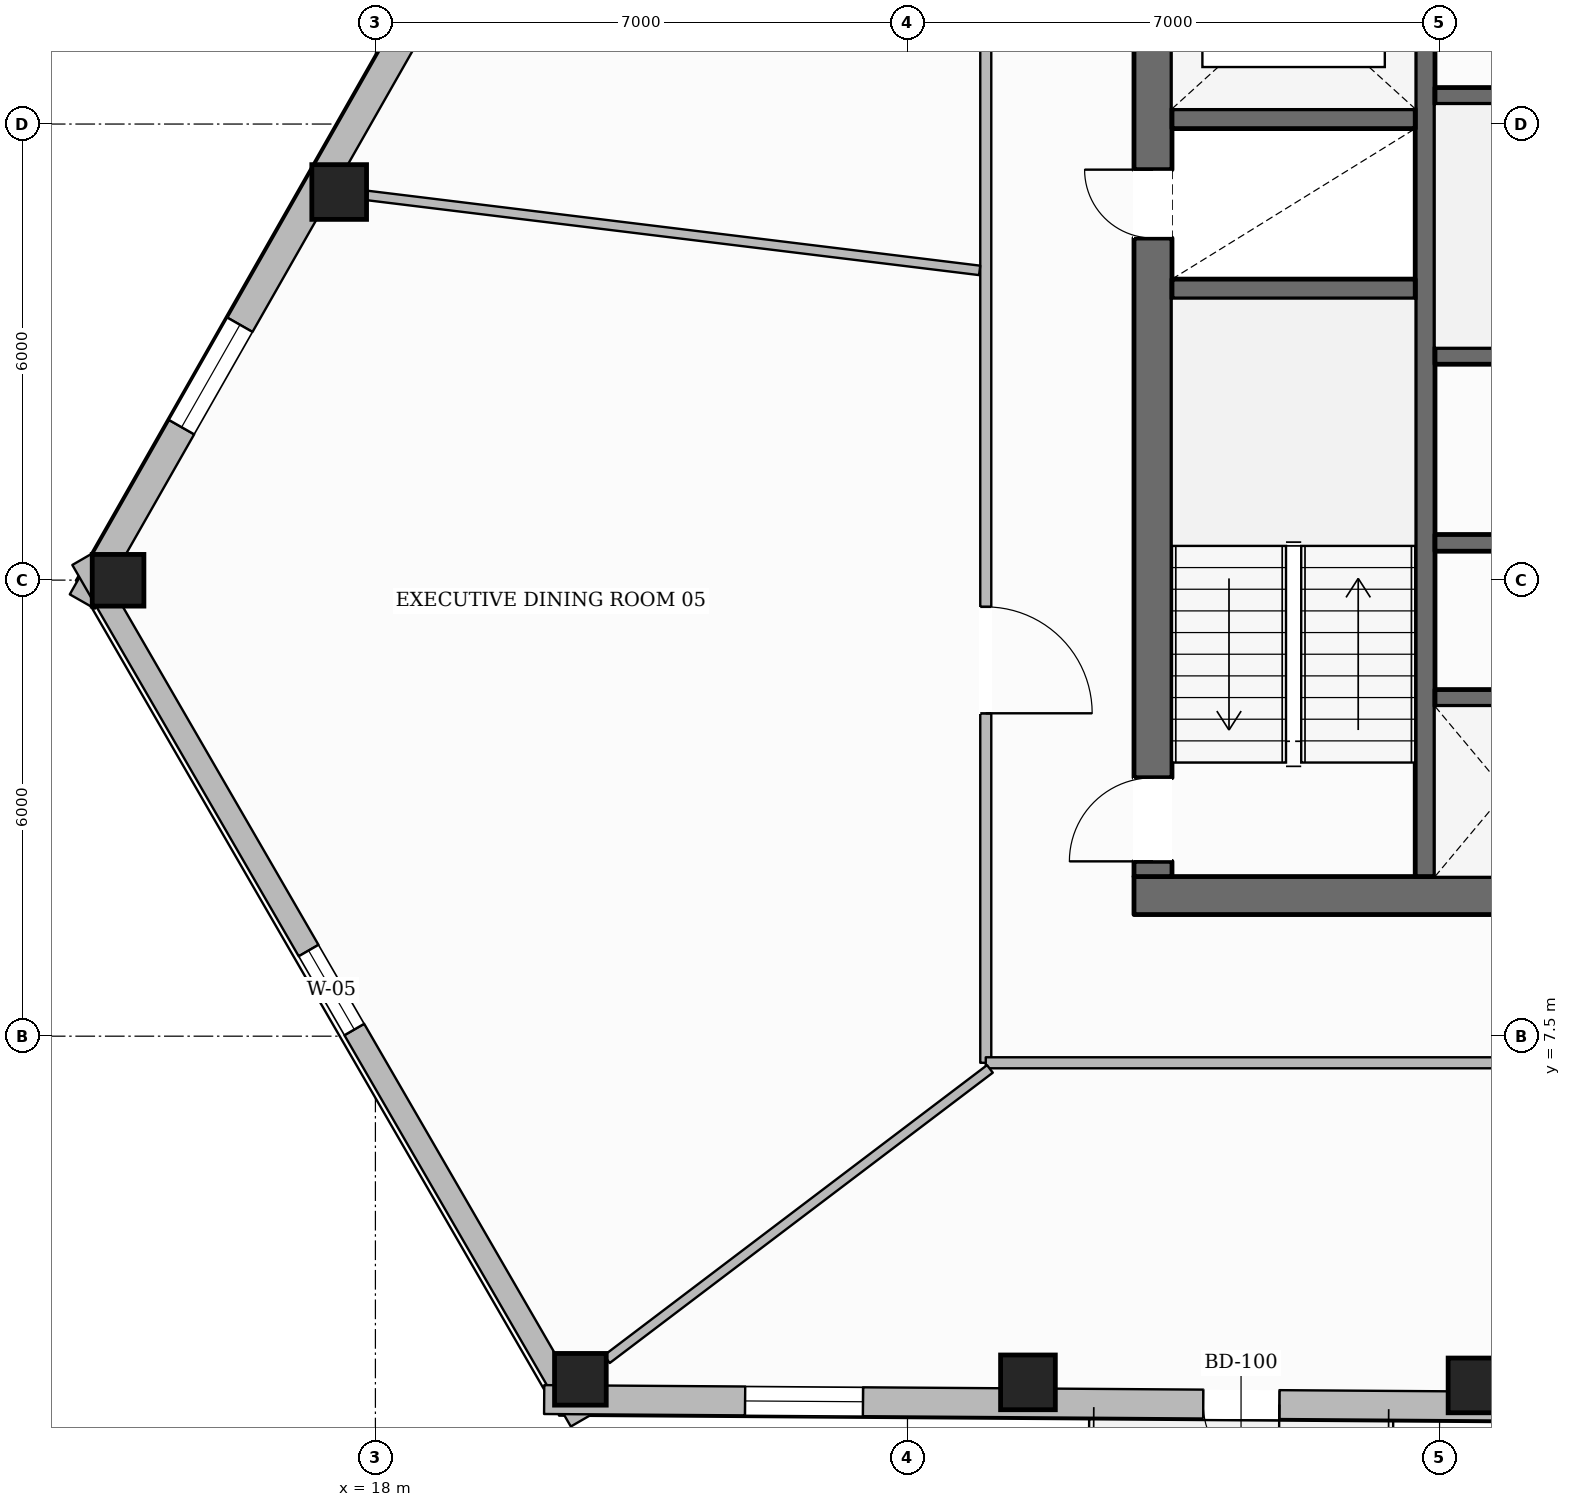
"""IFC4 building model, lengths in metres.
Left out: names, types, materials, properties, quantities, classifications, styles, units other than length and angle.
Written with IfcOpenShell. Run it as: python <this file> out.ifc"""

import sys

from ifc_helpers import new_model, si_unit, direction, frame, frame_2d, origin, origin_2d, place, context, subcontext, project, spatial, rectangle, hollow_rectangle, extrude, element, fill, save


model = new_model("IFC4")
c1 = context("Model", 3, precision=1e-05, world=origin(), true_north=direction((0.0, 1.0)))
c2 = subcontext(c1, "Body", "Model", "MODEL_VIEW")
j1 = project(units=[si_unit("LENGTHUNIT", "METRE"), si_unit("PLANEANGLEUNIT", "RADIAN")], contexts=[c1])
p1 = place(None, origin())
s1 = spatial("IfcSite", under=j1, at=p1, CompositionType="ELEMENT")
p2 = place(p1, origin())
s2 = spatial("IfcBuilding", under=s1, at=p2, CompositionType="ELEMENT")
p3 = place(p2, frame((0.0, 0.0, 112.45)))
s3 = spatial("IfcBuildingStorey", under=s2, at=p3, CompositionType="ELEMENT", Elevation=112.45)
p4 = place(p3, frame((27.98, 9.35, 0.0), z_axis=(0.0, 0.0, 1.0), x_axis=(1.0, 0.0, 0.0)))
e1 = element("IfcWall", 1, at=p4, inside=s3, PredefinedType="SOLIDWALL", context=c2, shape_type="SweptSolid", body=[
    extrude(rectangle(XDim=20.04, YDim=0.5, at=frame_2d((10.02, 0.0))), origin(), (0.0, 0.0, 1.0), 3.6),
])
p5 = place(p4, frame((10.52, 0.0, 0.0)))
e2 = element("IfcOpeningElement", 2, at=p5, cuts=e1, PredefinedType="OPENING", context=c2, shape_type="SweptSolid", body=[
    extrude(rectangle(XDim=1.4, YDim=2.2, at=frame_2d((0.7, 1.1))), frame((0.0, 0.26, 0.0), z_axis=(0.0, -1.0, 0.0), x_axis=(1.0, 0.0, 0.0)), (0.0, 0.0, 1.0), 0.52),
])
p6 = place(p3, frame((28.23, 9.6, 0.0), z_axis=(0.0, 0.0, 1.0), x_axis=(0.0, 1.0, 0.0)))
e3 = element("IfcWall", 3, at=p6, inside=s3, PredefinedType="SOLIDWALL", context=c2, shape_type="SweptSolid", body=[
    extrude(rectangle(XDim=13.0, YDim=0.5, at=frame_2d((6.5, 0.0))), origin(), (0.0, 0.0, 1.0), 3.6),
])
p7 = place(p6, frame((0.2, 0.0, 0.0)))
e4 = element("IfcOpeningElement", 4, at=p7, cuts=e3, PredefinedType="OPENING", context=c2, shape_type="SweptSolid", body=[
    extrude(rectangle(XDim=1.1, YDim=2.15, at=frame_2d((0.55, 1.075))), frame((0.0, 0.26, 0.0), z_axis=(0.0, -1.0, 0.0), x_axis=(1.0, 0.0, 0.0)), (0.0, 0.0, 1.0), 0.52),
])
p8 = place(p6, frame((8.4, 0.0, 0.0)))
e5 = element("IfcOpeningElement", 5, at=p8, cuts=e3, PredefinedType="OPENING", context=c2, shape_type="SweptSolid", body=[
    extrude(rectangle(XDim=0.9, YDim=2.1, at=frame_2d((0.45, 1.05))), frame((0.0, 0.26, 0.0), z_axis=(0.0, -1.0, 0.0), x_axis=(1.0, 0.0, 0.0)), (0.0, 0.0, 1.0), 0.52),
])
p9 = place(p3, frame((31.81, 9.6, 0.0), z_axis=(0.0, 0.0, 1.0), x_axis=(0.0, 1.0, 0.0)))
e6 = element("IfcWall", 6, at=p9, inside=s3, PredefinedType="SHEAR", context=c2, shape_type="SweptSolid", body=[
    extrude(rectangle(XDim=13.0, YDim=0.26, at=frame_2d((6.5, 0.0))), origin(), (0.0, 0.0, 1.0), 3.6),
])
p10 = place(p9, frame((10.925, 0.0, 0.0)))
e7 = element("IfcOpeningElement", 7, at=p10, cuts=e6, PredefinedType="OPENING", context=c2, shape_type="SweptSolid", body=[
    extrude(rectangle(XDim=1.25, YDim=2.25, at=frame_2d((0.625, 1.125))), frame((0.0, 0.14, 0.0), z_axis=(0.0, -1.0, 0.0), x_axis=(1.0, 0.0, 0.0)), (0.0, 0.0, 1.0), 0.28),
])
for number, where, z_axis, x_axis in (
    (8, (28.48, 17.33, 0.0), (0.0, 0.0, 1.0), (1.0, 0.0, 0.0)),
    (9, (28.48, 19.57, 0.0), (0.0, 0.0, 1.0), (1.0, 0.0, 0.0)),
):
    element("IfcWall", number, at=place(p3, frame(where, z_axis=z_axis, x_axis=x_axis)), inside=s3, PredefinedType="SHEAR", context=c2, shape_type="SweptSolid", body=[
        extrude(rectangle(XDim=3.2, YDim=0.26, at=frame_2d((1.6, 0.0))), origin(), (0.0, 0.0, 1.0), 3.6),
    ])
p11 = place(p3, frame((31.94, 19.87, 0.0), z_axis=(0.0, 0.0, 1.0), x_axis=(1.0, 0.0, 0.0)))
e10 = element("IfcWall", 10, at=p11, inside=s3, PredefinedType="SOLIDWALL", context=c2, shape_type="SweptSolid", body=[
    extrude(rectangle(XDim=12.12, YDim=0.22, at=frame_2d((6.06, 0.0))), origin(), (0.0, 0.0, 1.0), 3.6),
])
p12 = place(p11, frame((6.3, 0.0, 0.0)))
e11 = element("IfcOpeningElement", 11, at=p12, cuts=e10, PredefinedType="OPENING", context=c2, shape_type="SweptSolid", body=[
    extrude(rectangle(XDim=1.1, YDim=2.15, at=frame_2d((0.55, 1.075))), frame((0.0, 0.12, 0.0), z_axis=(0.0, -1.0, 0.0), x_axis=(1.0, 0.0, 0.0)), (0.0, 0.0, 1.0), 0.24),
])
p13 = place(p11, frame((8.01, 0.0, 0.0)))
e12 = element("IfcOpeningElement", 12, at=p13, cuts=e10, PredefinedType="OPENING", context=c2, shape_type="SweptSolid", body=[
    extrude(rectangle(XDim=0.9, YDim=2.1, at=frame_2d((0.45, 1.05))), frame((0.0, 0.12, 0.0), z_axis=(0.0, -1.0, 0.0), x_axis=(1.0, 0.0, 0.0)), (0.0, 0.0, 1.0), 0.24),
])
p14 = place(p11, frame((10.21, 0.0, 0.0)))
e13 = element("IfcOpeningElement", 13, at=p14, cuts=e10, PredefinedType="OPENING", context=c2, shape_type="SweptSolid", body=[
    extrude(rectangle(XDim=0.9, YDim=2.1, at=frame_2d((0.45, 1.05))), frame((0.0, 0.12, 0.0), z_axis=(0.0, -1.0, 0.0), x_axis=(1.0, 0.0, 0.0)), (0.0, 0.0, 1.0), 0.24),
])
p15 = place(p3, frame((31.94, 16.45, 0.0), z_axis=(0.0, 0.0, 1.0), x_axis=(1.0, 0.0, 0.0)))
e14 = element("IfcWall", 14, at=p15, inside=s3, PredefinedType="SOLIDWALL", context=c2, shape_type="SweptSolid", body=[
    extrude(rectangle(XDim=12.12, YDim=0.22, at=frame_2d((6.06, 0.0))), origin(), (0.0, 0.0, 1.0), 3.6),
])
p16 = place(p3, frame((31.94, 13.99, 0.0), z_axis=(0.0, 0.0, 1.0), x_axis=(1.0, 0.0, 0.0)))
e15 = element("IfcWall", 15, at=p16, inside=s3, PredefinedType="SOLIDWALL", context=c2, shape_type="SweptSolid", body=[
    extrude(rectangle(XDim=12.12, YDim=0.22, at=frame_2d((6.06, 0.0))), origin(), (0.0, 0.0, 1.0), 3.6),
])
p17 = place(p16, frame((2.51, 0.0, 0.0)))
e16 = element("IfcOpeningElement", 16, at=p17, cuts=e15, PredefinedType="OPENING", context=c2, shape_type="SweptSolid", body=[
    extrude(rectangle(XDim=0.9, YDim=2.1, at=frame_2d((0.45, 1.05))), frame((0.0, 0.12, 0.0), z_axis=(0.0, -1.0, 0.0), x_axis=(1.0, 0.0, 0.0)), (0.0, 0.0, 1.0), 0.24),
])
p18 = place(p16, frame((6.535, 0.0, 0.0)))
e17 = element("IfcOpeningElement", 17, at=p18, cuts=e15, PredefinedType="OPENING", context=c2, shape_type="SweptSolid", body=[
    extrude(rectangle(XDim=1.1, YDim=2.2, at=frame_2d((0.55, 1.1))), frame((0.0, 0.12, 0.0), z_axis=(0.0, -1.0, 0.0), x_axis=(1.0, 0.0, 0.0)), (0.0, 0.0, 1.0), 0.24),
])
p19 = place(p16, frame((8.585, 0.0, 0.0)))
e18 = element("IfcOpeningElement", 18, at=p19, cuts=e15, PredefinedType="OPENING", context=c2, shape_type="SweptSolid", body=[
    extrude(rectangle(XDim=1.1, YDim=2.2, at=frame_2d((0.55, 1.1))), frame((0.0, 0.12, 0.0), z_axis=(0.0, -1.0, 0.0), x_axis=(1.0, 0.0, 0.0)), (0.0, 0.0, 1.0), 0.24),
])
p20 = place(p16, frame((10.635, 0.0, 0.0)))
e19 = element("IfcOpeningElement", 19, at=p20, cuts=e15, PredefinedType="OPENING", context=c2, shape_type="SweptSolid", body=[
    extrude(rectangle(XDim=1.1, YDim=2.2, at=frame_2d((0.55, 1.1))), frame((0.0, 0.12, 0.0), z_axis=(0.0, -1.0, 0.0), x_axis=(1.0, 0.0, 0.0)), (0.0, 0.0, 1.0), 0.24),
])
p21 = place(p3, frame((31.94, 11.95, 0.0), z_axis=(0.0, 0.0, 1.0), x_axis=(1.0, 0.0, 0.0)))
e20 = element("IfcWall", 20, at=p21, inside=s3, PredefinedType="SOLIDWALL", context=c2, shape_type="SweptSolid", body=[
    extrude(rectangle(XDim=6.19, YDim=0.22, at=frame_2d((3.095, 0.0))), origin(), (0.0, 0.0, 1.0), 3.6),
])
p22 = place(p3, frame((17.523, 18.606, 0.0), z_axis=(0.0, 0.0, 1.0), x_axis=(1.0, 0.0, 0.0)))
e21 = element("IfcColumn", 21, at=p22, inside=s3, PredefinedType="COLUMN", context=c2, shape_type="SweptSolid", body=[
    extrude(hollow_rectangle(XDim=0.72, YDim=0.72, WallThickness=0.032, at=origin_2d()), origin(), (0.0, 0.0, 1.0), 3.6),
])
for number, where, z_axis, x_axis in (
    (22, (14.614, 13.498, 0.0), (0.0, 0.0, 1.0), (1.0, 0.0, 0.0)),
    (23, (20.697, 2.986, 0.0), (0.0, 0.0, 1.0), (1.0, 0.0, 0.0)),
):
    element("IfcColumn", number, at=place(p3, frame(where, z_axis=z_axis, x_axis=x_axis)), inside=s3, PredefinedType="COLUMN", context=c2, shape_type="SweptSolid", body=[
        extrude(hollow_rectangle(XDim=0.68, YDim=0.68, WallThickness=0.03, at=origin_2d()), origin(), (0.0, 0.0, 1.0), 3.6),
    ])
for number, where, z_axis, x_axis in (
    (24, (26.585, 2.946, 0.0), (0.0, 0.0, 1.0), (1.0, 0.0, 0.0)),
    (25, (32.473, 2.906, 0.0), (0.0, 0.0, 1.0), (1.0, 0.0, 0.0)),
):
    element("IfcColumn", number, at=place(p3, frame(where, z_axis=z_axis, x_axis=x_axis)), inside=s3, PredefinedType="COLUMN", context=c2, shape_type="SweptSolid", body=[
        extrude(hollow_rectangle(XDim=0.72, YDim=0.72, WallThickness=0.032, at=origin_2d()), origin(), (0.0, 0.0, 1.0), 3.6),
    ])
p23 = place(p3, frame((14.144, 13.219, 0.0), z_axis=(0.0, 0.0, 1.0), x_axis=(0.494900960409, 0.868949388277, 0.0)))
e26 = element("IfcWall", 26, at=p23, inside=s3, PredefinedType="STANDARD", context=c2, shape_type="SweptSolid", body=[
    extrude(rectangle(XDim=36.225, YDim=0.38, at=frame_2d((18.113, 0.0))), origin(), (0.0, 0.0, 1.0), 3.059),
])
p24 = place(p23, frame((32.03, 0.0, 0.65)))
e27 = element("IfcOpeningElement", 27, at=p24, cuts=e26, PredefinedType="OPENING", context=c2, shape_type="SweptSolid", body=[
    extrude(rectangle(XDim=1.55, YDim=1.75, at=frame_2d((0.775, 0.875))), frame((0.0, 0.2, 0.0), z_axis=(0.0, -1.0, 0.0), x_axis=(1.0, 0.0, 0.0)), (0.0, 0.0, 1.0), 0.4),
])
p25 = place(p23, frame((26.152, 0.0, 0.65)))
e28 = element("IfcOpeningElement", 28, at=p25, cuts=e26, PredefinedType="OPENING", context=c2, shape_type="SweptSolid", body=[
    extrude(rectangle(XDim=1.55, YDim=1.75, at=frame_2d((0.775, 0.875))), frame((0.0, 0.2, 0.0), z_axis=(0.0, -1.0, 0.0), x_axis=(1.0, 0.0, 0.0)), (0.0, 0.0, 1.0), 0.4),
])
p26 = place(p23, frame((20.274, 0.0, 0.65)))
e29 = element("IfcOpeningElement", 29, at=p26, cuts=e26, PredefinedType="OPENING", context=c2, shape_type="SweptSolid", body=[
    extrude(rectangle(XDim=1.55, YDim=1.75, at=frame_2d((0.775, 0.875))), frame((0.0, 0.2, 0.0), z_axis=(0.0, -1.0, 0.0), x_axis=(1.0, 0.0, 0.0)), (0.0, 0.0, 1.0), 0.4),
])
p27 = place(p23, frame((8.518, 0.0, 0.65)))
e30 = element("IfcOpeningElement", 30, at=p27, cuts=e26, PredefinedType="OPENING", context=c2, shape_type="SweptSolid", body=[
    extrude(rectangle(XDim=1.55, YDim=1.75, at=frame_2d((0.775, 0.875))), frame((0.0, 0.2, 0.0), z_axis=(0.0, -1.0, 0.0), x_axis=(1.0, 0.0, 0.0)), (0.0, 0.0, 1.0), 0.4),
])
p28 = place(p23, frame((2.64, 0.0, 0.65)))
e31 = element("IfcOpeningElement", 31, at=p28, cuts=e26, PredefinedType="OPENING", context=c2, shape_type="SweptSolid", body=[
    extrude(rectangle(XDim=1.55, YDim=1.75, at=frame_2d((0.775, 0.875))), frame((0.0, 0.2, 0.0), z_axis=(0.0, -1.0, 0.0), x_axis=(1.0, 0.0, 0.0)), (0.0, 0.0, 1.0), 0.4),
])
p29 = place(p3, frame((20.701, 2.44, 0.0), z_axis=(0.0, 0.0, 1.0), x_axis=(-0.50082386504, 0.86554922229, 0.0)))
e32 = element("IfcWall", 32, at=p29, inside=s3, PredefinedType="STANDARD", context=c2, shape_type="SweptSolid", body=[
    extrude(rectangle(XDim=13.095, YDim=0.3, at=frame_2d((6.548, 0.0))), origin(), (0.0, 0.0, 1.0), 3.059),
])
p30 = place(p29, frame((5.948, 0.0, 0.65)))
e33 = element("IfcOpeningElement", 33, at=p30, cuts=e32, PredefinedType="OPENING", context=c2, shape_type="SweptSolid", body=[
    extrude(rectangle(XDim=1.2, YDim=1.7, at=frame_2d((0.6, 0.85))), frame((0.0, 0.16, 0.0), z_axis=(0.0, -1.0, 0.0), x_axis=(1.0, 0.0, 0.0)), (0.0, 0.0, 1.0), 0.32),
])
p31 = place(p3, frame((56.505, 2.471, 0.0), z_axis=(0.0, 0.0, 1.0), x_axis=(-0.999976634765, 0.0068359289, 0.0)))
e34 = element("IfcWall", 34, at=p31, inside=s3, PredefinedType="STANDARD", context=c2, shape_type="SweptSolid", body=[
    extrude(rectangle(XDim=36.286, YDim=0.38, at=frame_2d((18.143, 0.0))), origin(), (0.0, 0.0, 1.0), 3.059),
])
p32 = place(p31, frame((26.614, 0.0, 0.0)))
e35 = element("IfcOpeningElement", 35, at=p32, cuts=e34, PredefinedType="OPENING", context=c2, shape_type="SweptSolid", body=[
    extrude(rectangle(XDim=1.0, YDim=2.2, at=frame_2d((0.5, 1.1))), frame((0.0, 0.2, 0.0), z_axis=(0.0, -1.0, 0.0), x_axis=(1.0, 0.0, 0.0)), (0.0, 0.0, 1.0), 0.4),
])
p33 = place(p31, frame((32.092, 0.0, 0.65)))
e36 = element("IfcOpeningElement", 36, at=p33, cuts=e34, PredefinedType="OPENING", context=c2, shape_type="SweptSolid", body=[
    extrude(rectangle(XDim=1.55, YDim=1.75, at=frame_2d((0.775, 0.875))), frame((0.0, 0.2, 0.0), z_axis=(0.0, -1.0, 0.0), x_axis=(1.0, 0.0, 0.0)), (0.0, 0.0, 1.0), 0.4),
])
p34 = place(p31, frame((20.315, 0.0, 0.65)))
e37 = element("IfcOpeningElement", 37, at=p34, cuts=e34, PredefinedType="OPENING", context=c2, shape_type="SweptSolid", body=[
    extrude(rectangle(XDim=1.55, YDim=1.75, at=frame_2d((0.775, 0.875))), frame((0.0, 0.2, 0.0), z_axis=(0.0, -1.0, 0.0), x_axis=(1.0, 0.0, 0.0)), (0.0, 0.0, 1.0), 0.4),
])
p35 = place(p31, frame((8.539, 0.0, 0.65)))
e38 = element("IfcOpeningElement", 38, at=p35, cuts=e34, PredefinedType="OPENING", context=c2, shape_type="SweptSolid", body=[
    extrude(rectangle(XDim=1.55, YDim=1.75, at=frame_2d((0.775, 0.875))), frame((0.0, 0.2, 0.0), z_axis=(0.0, -1.0, 0.0), x_axis=(1.0, 0.0, 0.0)), (0.0, 0.0, 1.0), 0.4),
])
p36 = place(p31, frame((2.65, 0.0, 0.65)))
e39 = element("IfcOpeningElement", 39, at=p36, cuts=e34, PredefinedType="OPENING", context=c2, shape_type="SweptSolid", body=[
    extrude(rectangle(XDim=1.55, YDim=1.75, at=frame_2d((0.775, 0.875))), frame((0.0, 0.2, 0.0), z_axis=(0.0, -1.0, 0.0), x_axis=(1.0, 0.0, 0.0)), (0.0, 0.0, 1.0), 0.4),
])
p37 = place(p3, frame((26.03, 25.05, 0.0), z_axis=(0.0, 0.0, 1.0), x_axis=(0.0, -1.0, 0.0)))
e40 = element("IfcWall", 40, at=p37, inside=s3, PredefinedType="PARTITIONING", context=c2, shape_type="SweptSolid", body=[
    extrude(rectangle(XDim=17.9, YDim=0.145, at=frame_2d((8.95, 0.0))), origin(), (0.0, 0.0, 1.0), 3.288),
])
p38 = place(p37, frame((3.333, 0.0, 0.0)))
e41 = element("IfcOpeningElement", 41, at=p38, cuts=e40, PredefinedType="OPENING", context=c2, shape_type="SweptSolid", body=[
    extrude(rectangle(XDim=0.98, YDim=2.15, at=frame_2d((0.49, 1.075))), frame((0.0, 0.083, 0.0), z_axis=(0.0, -1.0, 0.0), x_axis=(1.0, 0.0, 0.0)), (0.0, 0.0, 1.0), 0.165),
])
p39 = place(p37, frame((11.902, 0.0, 0.0)))
e42 = element("IfcOpeningElement", 42, at=p39, cuts=e40, PredefinedType="OPENING", context=c2, shape_type="SweptSolid", body=[
    extrude(rectangle(XDim=1.4, YDim=2.2, at=frame_2d((0.7, 1.1))), frame((0.0, 0.083, 0.0), z_axis=(0.0, -1.0, 0.0), x_axis=(1.0, 0.0, 0.0)), (0.0, 0.0, 1.0), 0.165),
])
p40 = place(p3, frame((26.03, 7.15, 0.0), z_axis=(0.0, 0.0, 1.0), x_axis=(1.0, 0.0, 0.0)))
e43 = element("IfcWall", 43, at=p40, inside=s3, PredefinedType="PARTITIONING", context=c2, shape_type="SweptSolid", body=[
    extrude(rectangle(XDim=23.94, YDim=0.145, at=frame_2d((11.97, 0.0))), origin(), (0.0, 0.0, 1.0), 3.6),
])
p41 = place(p40, frame((7.494, 0.0, 0.0)))
e44 = element("IfcOpeningElement", 44, at=p41, cuts=e43, PredefinedType="OPENING", context=c2, shape_type="SweptSolid", body=[
    extrude(rectangle(XDim=1.4, YDim=2.2, at=frame_2d((0.7, 1.1))), frame((0.0, 0.083, 0.0), z_axis=(0.0, -1.0, 0.0), x_axis=(1.0, 0.0, 0.0)), (0.0, 0.0, 1.0), 0.165),
])
p42 = place(p40, frame((19.496, 0.0, 0.0)))
e45 = element("IfcOpeningElement", 45, at=p42, cuts=e43, PredefinedType="OPENING", context=c2, shape_type="SweptSolid", body=[
    extrude(rectangle(XDim=1.4, YDim=2.2, at=frame_2d((0.7, 1.1))), frame((0.0, 0.083, 0.0), z_axis=(0.0, -1.0, 0.0), x_axis=(1.0, 0.0, 0.0)), (0.0, 0.0, 1.0), 0.165),
])
p43 = place(p3, frame((25.949, 17.575, 0.0), z_axis=(0.0, 0.0, 1.0), x_axis=(-0.992595641005, 0.121465606072, 0.0)))
e46 = element("IfcWall", 46, at=p43, inside=s3, PredefinedType="PARTITIONING", context=c2, shape_type="SweptSolid", body=[
    extrude(rectangle(XDim=8.118, YDim=0.125, at=frame_2d((4.059, 0.0))), origin(), (0.0, 0.0, 1.0), 3.141),
])
p44 = place(p3, frame((26.085, 7.07, 0.0), z_axis=(0.0, 0.0, 1.0), x_axis=(-0.796955292874, -0.604038294449, 0.0)))
e47 = element("IfcWall", 47, at=p44, inside=s3, PredefinedType="PARTITIONING", context=c2, shape_type="SweptSolid", body=[
    extrude(rectangle(XDim=6.324, YDim=0.125, at=frame_2d((3.162, 0.0))), origin(), (0.0, 0.0, 1.0), 3.141),
])
p45 = place(p32, origin())
e48 = element("IfcDoor", 48, at=p45, inside=s3, OperationType="SINGLE_SWING_LEFT", PredefinedType="DOOR", context=c2, shape_type="SweptSolid", body=[
    extrude(rectangle(XDim=1.0, YDim=2.2, at=frame_2d((0.5, 1.1))), frame((0.0, 0.025, 0.0), z_axis=(0.0, -1.0, 0.0), x_axis=(1.0, 0.0, 0.0)), (0.0, 0.0, 1.0), 0.05),
])
fill(e35, e48)
p46 = place(p28, origin())
e49 = element("IfcWindow", 49, at=p46, inside=s3, PartitioningType="SINGLE_PANEL", PredefinedType="WINDOW", context=c2, shape_type="SweptSolid", body=[
    extrude(rectangle(XDim=1.55, YDim=1.75, at=frame_2d((0.775, 0.875))), frame((0.0, 0.03, 0.0), z_axis=(0.0, -1.0, 0.0), x_axis=(1.0, 0.0, 0.0)), (0.0, 0.0, 1.0), 0.06),
])
fill(e31, e49)
p47 = place(p33, origin())
e50 = element("IfcWindow", 50, at=p47, inside=s3, PartitioningType="SINGLE_PANEL", PredefinedType="WINDOW", context=c2, shape_type="SweptSolid", body=[
    extrude(rectangle(XDim=1.55, YDim=1.75, at=frame_2d((0.775, 0.875))), frame((0.0, 0.03, 0.0), z_axis=(0.0, -1.0, 0.0), x_axis=(1.0, 0.0, 0.0)), (0.0, 0.0, 1.0), 0.06),
])
fill(e36, e50)
p48 = place(p30, origin())
e51 = element("IfcWindow", 51, at=p48, inside=s3, PartitioningType="SINGLE_PANEL", PredefinedType="WINDOW", context=c2, shape_type="SweptSolid", body=[
    extrude(rectangle(XDim=1.2, YDim=1.7, at=frame_2d((0.6, 0.85))), frame((0.0, 0.03, 0.0), z_axis=(0.0, -1.0, 0.0), x_axis=(1.0, 0.0, 0.0)), (0.0, 0.0, 1.0), 0.06),
])
fill(e33, e51)
p49 = place(p7, origin())
e52 = element("IfcDoor", 52, at=p49, inside=s3, OperationType="SINGLE_SWING_LEFT", PredefinedType="DOOR", context=c2, shape_type="SweptSolid", body=[
    extrude(rectangle(XDim=1.1, YDim=2.15, at=frame_2d((0.55, 1.075))), frame((0.0, 0.025, 0.0), z_axis=(0.0, -1.0, 0.0), x_axis=(1.0, 0.0, 0.0)), (0.0, 0.0, 1.0), 0.05),
])
fill(e4, e52)
p50 = place(p8, origin())
e53 = element("IfcDoor", 53, at=p50, inside=s3, OperationType="SINGLE_SWING_RIGHT", PredefinedType="DOOR", context=c2, shape_type="SweptSolid", body=[
    extrude(rectangle(XDim=0.9, YDim=2.1, at=frame_2d((0.45, 1.05))), frame((0.0, 0.025, 0.0), z_axis=(0.0, -1.0, 0.0), x_axis=(1.0, 0.0, 0.0)), (0.0, 0.0, 1.0), 0.05),
])
fill(e5, e53)
p51 = place(p39, origin())
e54 = element("IfcDoor", 54, at=p51, inside=s3, OperationType="SINGLE_SWING_RIGHT", PredefinedType="DOOR", context=c2, shape_type="SweptSolid", body=[
    extrude(rectangle(XDim=1.4, YDim=2.2, at=frame_2d((0.7, 1.1))), frame((0.0, 0.025, 0.0), z_axis=(0.0, -1.0, 0.0), x_axis=(1.0, 0.0, 0.0)), (0.0, 0.0, 1.0), 0.05),
])
fill(e42, e54)
save(model, sys.argv[1])
